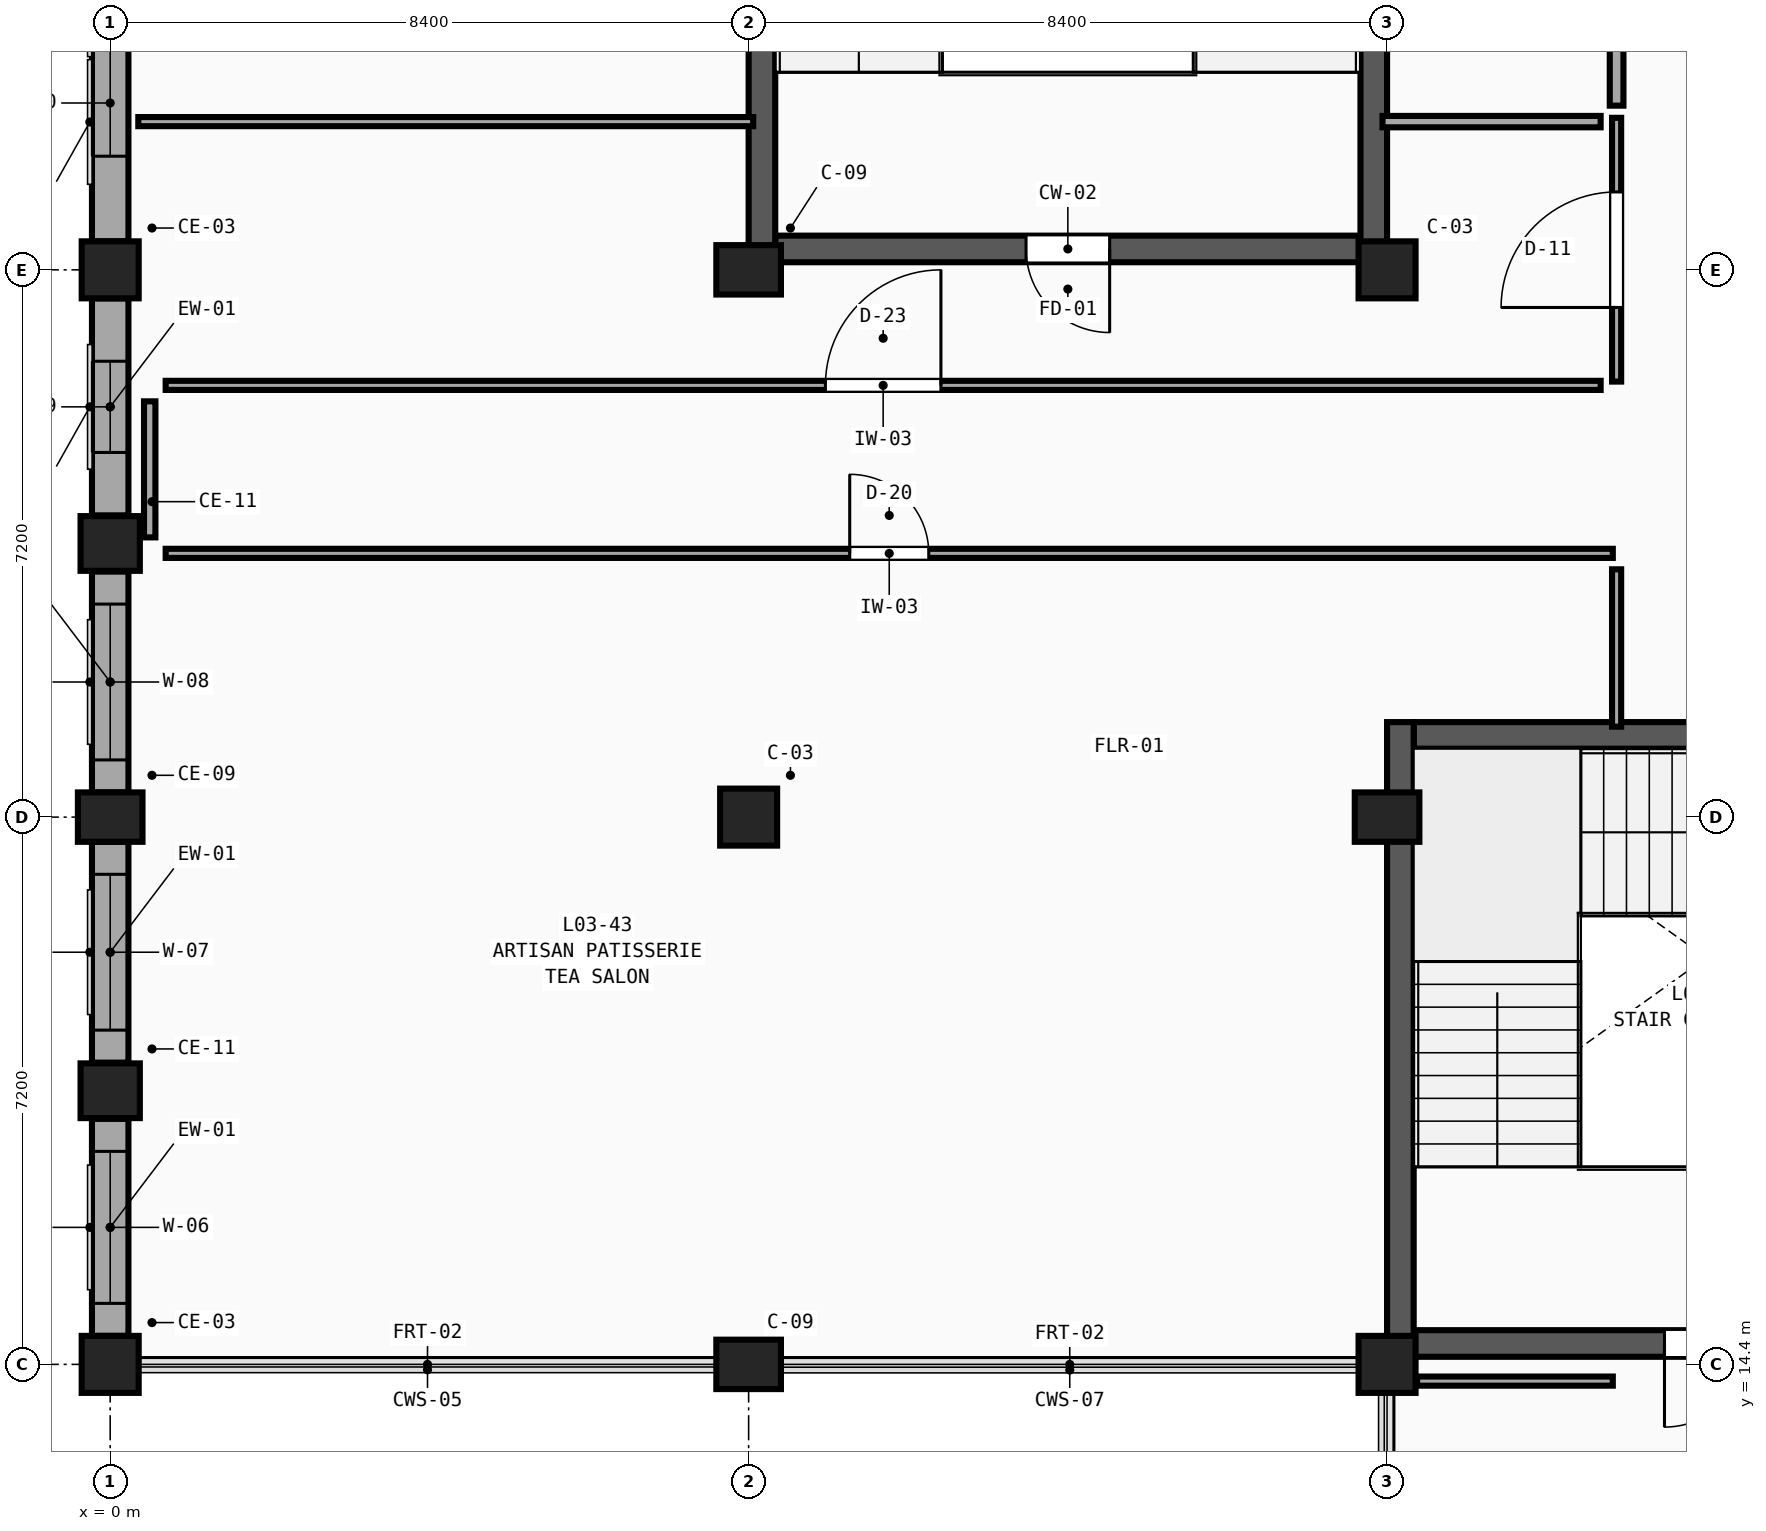
"""IFC4 building model, lengths in metres.
Left out: names, types, materials, properties, quantities, classifications, styles, units other than length and angle.
Written with IfcOpenShell. Run it as: python <this file> out.ifc"""

import sys

from ifc_helpers import new_model, si_unit, direction, frame, frame_2d, origin, origin_2d, place, context, subcontext, project, spatial, rectangle, extrude, element, fill, save


model = new_model("IFC4")
c1 = context("Model", 3, precision=1e-05, world=origin(), true_north=direction((0.0, 1.0)))
c2 = subcontext(c1, "Body", "Model", "MODEL_VIEW")
j1 = project(units=[si_unit("LENGTHUNIT", "METRE"), si_unit("PLANEANGLEUNIT", "RADIAN")], contexts=[c1])
p1 = place(None, origin())
s1 = spatial("IfcSite", under=j1, at=p1, CompositionType="ELEMENT")
p2 = place(p1, origin())
s2 = spatial("IfcBuilding", under=s1, at=p2, CompositionType="ELEMENT")
p3 = place(p2, frame((0.0, 0.0, 14.4)))
s3 = spatial("IfcBuildingStorey", under=s2, at=p3, CompositionType="ELEMENT", Elevation=14.4)
p4 = place(p3, frame((0.0, 14.4, 0.0), z_axis=(0.0, 0.0, 1.0), x_axis=(1.0, 0.0, 0.0)))
e1 = element("IfcColumn", 1, at=p4, inside=s3, PredefinedType="COLUMN", context=c2, shape_type="SweptSolid", body=[
    extrude(rectangle(XDim=0.75, YDim=0.75, at=origin_2d()), origin(), (0.0, 0.0, 1.0), 4.5),
])
p5 = place(p3, frame((0.0, 21.6, 0.0), z_axis=(0.0, 0.0, 1.0), x_axis=(1.0, 0.0, 0.0)))
e2 = element("IfcColumn", 2, at=p5, inside=s3, PredefinedType="COLUMN", context=c2, shape_type="SweptSolid", body=[
    extrude(rectangle(XDim=0.85, YDim=0.65, at=origin_2d()), origin(), (0.0, 0.0, 1.0), 4.5),
])
p6 = place(p3, frame((0.0, 28.8, 0.0), z_axis=(0.0, 0.0, 1.0), x_axis=(1.0, 0.0, 0.0)))
e3 = element("IfcColumn", 3, at=p6, inside=s3, PredefinedType="COLUMN", context=c2, shape_type="SweptSolid", body=[
    extrude(rectangle(XDim=0.75, YDim=0.75, at=origin_2d()), origin(), (0.0, 0.0, 1.0), 4.5),
])
p7 = place(p3, frame((8.4, 14.4, 0.0), z_axis=(0.0, 0.0, 1.0), x_axis=(1.0, 0.0, 0.0)))
e4 = element("IfcColumn", 4, at=p7, inside=s3, PredefinedType="COLUMN", context=c2, shape_type="SweptSolid", body=[
    extrude(rectangle(XDim=0.85, YDim=0.65, at=origin_2d()), origin(), (0.0, 0.0, 1.0), 4.5),
])
p8 = place(p3, frame((8.4, 21.6, 0.0), z_axis=(0.0, 0.0, 1.0), x_axis=(1.0, 0.0, 0.0)))
e5 = element("IfcColumn", 5, at=p8, inside=s3, PredefinedType="COLUMN", context=c2, shape_type="SweptSolid", body=[
    extrude(rectangle(XDim=0.75, YDim=0.75, at=origin_2d()), origin(), (0.0, 0.0, 1.0), 4.5),
])
p9 = place(p3, frame((8.4, 28.8, 0.0), z_axis=(0.0, 0.0, 1.0), x_axis=(1.0, 0.0, 0.0)))
e6 = element("IfcColumn", 6, at=p9, inside=s3, PredefinedType="COLUMN", context=c2, shape_type="SweptSolid", body=[
    extrude(rectangle(XDim=0.85, YDim=0.65, at=origin_2d()), origin(), (0.0, 0.0, 1.0), 4.5),
])
p10 = place(p3, frame((16.8, 14.4, 0.0), z_axis=(0.0, 0.0, 1.0), x_axis=(1.0, 0.0, 0.0)))
e7 = element("IfcColumn", 7, at=p10, inside=s3, PredefinedType="COLUMN", context=c2, shape_type="SweptSolid", body=[
    extrude(rectangle(XDim=0.75, YDim=0.75, at=origin_2d()), origin(), (0.0, 0.0, 1.0), 4.5),
])
p11 = place(p3, frame((16.8, 21.6, 0.0), z_axis=(0.0, 0.0, 1.0), x_axis=(1.0, 0.0, 0.0)))
e8 = element("IfcColumn", 8, at=p11, inside=s3, PredefinedType="COLUMN", context=c2, shape_type="SweptSolid", body=[
    extrude(rectangle(XDim=0.85, YDim=0.65, at=origin_2d()), origin(), (0.0, 0.0, 1.0), 4.5),
])
p12 = place(p3, frame((16.8, 28.8, 0.0), z_axis=(0.0, 0.0, 1.0), x_axis=(1.0, 0.0, 0.0)))
e9 = element("IfcColumn", 9, at=p12, inside=s3, PredefinedType="COLUMN", context=c2, shape_type="SweptSolid", body=[
    extrude(rectangle(XDim=0.75, YDim=0.75, at=origin_2d()), origin(), (0.0, 0.0, 1.0), 4.5),
])
for number, where, z_axis, x_axis in (
    (10, (0.0, 18.0, 0.0), (0.0, 0.0, 1.0), (1.0, 0.0, 0.0)),
    (11, (0.0, 25.2, 0.0), (0.0, 0.0, 1.0), (1.0, 0.0, 0.0)),
):
    element("IfcColumn", number, at=place(p3, frame(where, z_axis=z_axis, x_axis=x_axis)), inside=s3, PredefinedType="PILASTER", context=c2, shape_type="SweptSolid", body=[
        extrude(rectangle(XDim=0.78, YDim=0.72, at=origin_2d()), origin(), (0.0, 0.0, 1.0), 4.5),
    ])
p13 = place(p3, frame((0.0, 14.775, 0.0), z_axis=(0.0, 0.0, 1.0), x_axis=(0.0, 1.0, 0.0)))
e12 = element("IfcWall", 12, at=p13, inside=s3, PredefinedType="SOLIDWALL", context=c2, shape_type="SweptSolid", body=[
    extrude(rectangle(XDim=2.855, YDim=0.48, at=frame_2d((1.427, 0.0))), origin(), (0.0, 0.0, 1.0), 3.63),
])
p14 = place(p13, frame((0.427, 0.0, 0.75)))
e13 = element("IfcOpeningElement", 13, at=p14, cuts=e12, PredefinedType="OPENING", context=c2, shape_type="SweptSolid", body=[
    extrude(rectangle(XDim=2.0, YDim=1.9, at=frame_2d((1.0, 0.95))), frame((0.0, 0.26, 0.0), z_axis=(0.0, -1.0, 0.0), x_axis=(1.0, 0.0, 0.0)), (0.0, 0.0, 1.0), 0.52),
])
p15 = place(p3, frame((0.0, 18.37, 0.0), z_axis=(0.0, 0.0, 1.0), x_axis=(0.0, 1.0, 0.0)))
e14 = element("IfcWall", 14, at=p15, inside=s3, PredefinedType="SOLIDWALL", context=c2, shape_type="SweptSolid", body=[
    extrude(rectangle(XDim=2.905, YDim=0.48, at=frame_2d((1.452, 0.0))), origin(), (0.0, 0.0, 1.0), 3.63),
])
p16 = place(p15, frame((0.427, 0.0, 0.75)))
e15 = element("IfcOpeningElement", 15, at=p16, cuts=e14, PredefinedType="OPENING", context=c2, shape_type="SweptSolid", body=[
    extrude(rectangle(XDim=2.05, YDim=1.9, at=frame_2d((1.025, 0.95))), frame((0.0, 0.26, 0.0), z_axis=(0.0, -1.0, 0.0), x_axis=(1.0, 0.0, 0.0)), (0.0, 0.0, 1.0), 0.52),
])
p17 = place(p3, frame((0.0, 21.925, 0.0), z_axis=(0.0, 0.0, 1.0), x_axis=(0.0, 1.0, 0.0)))
e16 = element("IfcWall", 16, at=p17, inside=s3, PredefinedType="SOLIDWALL", context=c2, shape_type="SweptSolid", body=[
    extrude(rectangle(XDim=2.905, YDim=0.48, at=frame_2d((1.453, 0.0))), origin(), (0.0, 0.0, 1.0), 3.63),
])
p18 = place(p17, frame((0.427, 0.0, 0.75)))
e17 = element("IfcOpeningElement", 17, at=p18, cuts=e16, PredefinedType="OPENING", context=c2, shape_type="SweptSolid", body=[
    extrude(rectangle(XDim=2.05, YDim=1.9, at=frame_2d((1.025, 0.95))), frame((0.0, 0.26, 0.0), z_axis=(0.0, -1.0, 0.0), x_axis=(1.0, 0.0, 0.0)), (0.0, 0.0, 1.0), 0.52),
])
p19 = place(p3, frame((0.0, 25.57, 0.0), z_axis=(0.0, 0.0, 1.0), x_axis=(0.0, 1.0, 0.0)))
e18 = element("IfcWall", 18, at=p19, inside=s3, PredefinedType="SOLIDWALL", context=c2, shape_type="SweptSolid", body=[
    extrude(rectangle(XDim=2.855, YDim=0.48, at=frame_2d((1.427, 0.0))), origin(), (0.0, 0.0, 1.0), 3.63),
])
p20 = place(p19, frame((0.827, 0.0, 0.75)))
e19 = element("IfcOpeningElement", 19, at=p20, cuts=e18, PredefinedType="OPENING", context=c2, shape_type="SweptSolid", body=[
    extrude(rectangle(XDim=1.2, YDim=2.08, at=frame_2d((0.6, 1.04))), frame((0.0, 0.26, 0.0), z_axis=(0.0, -1.0, 0.0), x_axis=(1.0, 0.0, 0.0)), (0.0, 0.0, 1.0), 0.52),
])
p21 = place(p3, frame((0.0, 29.175, 0.0), z_axis=(0.0, 0.0, 1.0), x_axis=(0.0, 1.0, 0.0)))
e20 = element("IfcWall", 20, at=p21, inside=s3, PredefinedType="SOLIDWALL", context=c2, shape_type="SweptSolid", body=[
    extrude(rectangle(XDim=6.5, YDim=0.48, at=frame_2d((3.25, 0.0))), origin(), (0.0, 0.0, 1.0), 3.63),
])
p22 = place(p21, frame((1.12, 0.0, 0.75)))
e21 = element("IfcOpeningElement", 21, at=p22, cuts=e20, PredefinedType="OPENING", context=c2, shape_type="SweptSolid", body=[
    extrude(rectangle(XDim=1.4, YDim=2.08, at=frame_2d((0.7, 1.04))), frame((0.0, 0.26, 0.0), z_axis=(0.0, -1.0, 0.0), x_axis=(1.0, 0.0, 0.0)), (0.0, 0.0, 1.0), 0.52),
])
p23 = place(p21, frame((3.88, 0.0, 0.75)))
e22 = element("IfcOpeningElement", 22, at=p23, cuts=e20, PredefinedType="OPENING", context=c2, shape_type="SweptSolid", body=[
    extrude(rectangle(XDim=1.6, YDim=2.08, at=frame_2d((0.8, 1.04))), frame((0.0, 0.26, 0.0), z_axis=(0.0, -1.0, 0.0), x_axis=(1.0, 0.0, 0.0)), (0.0, 0.0, 1.0), 0.52),
])
p24 = place(p3, frame((24.85, 14.675, 0.0), z_axis=(0.0, 0.0, 1.0), x_axis=(-1.0, 0.0, 0.0)))
e23 = element("IfcWall", 23, at=p24, inside=s3, PredefinedType="SHEAR", context=c2, shape_type="SweptSolid", body=[
    extrude(rectangle(XDim=7.7, YDim=0.35, at=frame_2d((3.85, 0.0))), origin(), (0.0, 0.0, 1.0), 4.5),
])
p25 = place(p24, frame((3.3, 0.0, 0.0)))
e24 = element("IfcOpeningElement", 24, at=p25, cuts=e23, PredefinedType="OPENING", context=c2, shape_type="SweptSolid", body=[
    extrude(rectangle(XDim=1.1, YDim=2.2, at=frame_2d((0.55, 1.1))), frame((0.0, 0.195, 0.0), z_axis=(0.0, -1.0, 0.0), x_axis=(1.0, 0.0, 0.0)), (0.0, 0.0, 1.0), 0.39),
])
p26 = place(p3, frame((17.15, 22.675, 0.0), z_axis=(0.0, 0.0, 1.0), x_axis=(1.0, 0.0, 0.0)))
e25 = element("IfcWall", 25, at=p26, inside=s3, PredefinedType="SHEAR", context=c2, shape_type="SweptSolid", body=[
    extrude(rectangle(XDim=7.7, YDim=0.35, at=frame_2d((3.85, 0.0))), origin(), (0.0, 0.0, 1.0), 4.5),
])
p27 = place(p3, frame((16.975, 22.85, 0.0), z_axis=(0.0, 0.0, 1.0), x_axis=(0.0, -1.0, 0.0)))
e26 = element("IfcWall", 26, at=p27, inside=s3, PredefinedType="SHEAR", context=c2, shape_type="SweptSolid", body=[
    extrude(rectangle(XDim=8.35, YDim=0.35, at=frame_2d((4.175, 0.0))), origin(), (0.0, 0.0, 1.0), 4.5),
])
p28 = place(p3, frame((16.45, 29.075, 0.0), z_axis=(0.0, 0.0, 1.0), x_axis=(-1.0, 0.0, 0.0)))
e27 = element("IfcWall", 27, at=p28, inside=s3, PredefinedType="SHEAR", context=c2, shape_type="SweptSolid", body=[
    extrude(rectangle(XDim=7.7, YDim=0.35, at=frame_2d((3.85, 0.0))), origin(), (0.0, 0.0, 1.0), 4.5),
])
p29 = place(p28, frame((3.3, 0.0, 0.0)))
e28 = element("IfcOpeningElement", 28, at=p29, cuts=e27, PredefinedType="OPENING", context=c2, shape_type="SweptSolid", body=[
    extrude(rectangle(XDim=1.1, YDim=2.2, at=frame_2d((0.55, 1.1))), frame((0.0, 0.195, 0.0), z_axis=(0.0, -1.0, 0.0), x_axis=(1.0, 0.0, 0.0)), (0.0, 0.0, 1.0), 0.39),
])
for number, where, z_axis, x_axis in (
    (29, (8.575, 37.25, 0.0), (0.0, 0.0, 1.0), (0.0, -1.0, 0.0)),
    (30, (16.625, 28.9, 0.0), (0.0, 0.0, 1.0), (0.0, 1.0, 0.0)),
):
    element("IfcWall", number, at=place(p3, frame(where, z_axis=z_axis, x_axis=x_axis)), inside=s3, PredefinedType="SHEAR", context=c2, shape_type="SweptSolid", body=[
        extrude(rectangle(XDim=8.35, YDim=0.35, at=frame_2d((4.175, 0.0))), origin(), (0.0, 0.0, 1.0), 4.5),
    ])
p30 = place(p3, frame((0.73, 25.07, 0.0), z_axis=(0.0, 0.0, 1.0), x_axis=(1.0, 0.0, 0.0)))
e31 = element("IfcWall", 31, at=p30, inside=s3, PredefinedType="PARTITIONING", context=c2, shape_type="SweptSolid", body=[
    extrude(rectangle(XDim=19.04, YDim=0.12, at=frame_2d((9.52, 0.0))), origin(), (0.0, 0.0, 1.0), 4.18),
])
p31 = place(p30, frame((9.0, 0.0, 0.0)))
e32 = element("IfcOpeningElement", 32, at=p31, cuts=e31, PredefinedType="OPENING", context=c2, shape_type="SweptSolid", body=[
    extrude(rectangle(XDim=1.04, YDim=2.29, at=frame_2d((0.52, 1.145))), frame((0.0, 0.08, 0.0), z_axis=(0.0, -1.0, 0.0), x_axis=(1.0, 0.0, 0.0)), (0.0, 0.0, 1.0), 0.16),
])
p32 = place(p3, frame((0.73, 27.28, 0.0), z_axis=(0.0, 0.0, 1.0), x_axis=(1.0, 0.0, 0.0)))
e33 = element("IfcWall", 33, at=p32, inside=s3, PredefinedType="PARTITIONING", context=c2, shape_type="SweptSolid", body=[
    extrude(rectangle(XDim=18.88, YDim=0.12, at=frame_2d((9.44, 0.0))), origin(), (0.0, 0.0, 1.0), 4.18),
])
p33 = place(p32, frame((8.68, 0.0, 0.0)))
e34 = element("IfcOpeningElement", 34, at=p33, cuts=e33, PredefinedType="OPENING", context=c2, shape_type="SweptSolid", body=[
    extrude(rectangle(XDim=1.52, YDim=2.29, at=frame_2d((0.76, 1.145))), frame((0.0, 0.08, 0.0), z_axis=(0.0, -1.0, 0.0), x_axis=(1.0, 0.0, 0.0)), (0.0, 0.0, 1.0), 0.16),
])
p34 = place(p3, frame((19.82, 30.96, 0.0), z_axis=(0.0, 0.0, 1.0), x_axis=(0.0, 1.0, 0.0)))
e35 = element("IfcWall", 35, at=p34, inside=s3, PredefinedType="PARTITIONING", context=c2, shape_type="SweptSolid", body=[
    extrude(rectangle(XDim=5.84, YDim=0.18, at=frame_2d((2.92, 0.0))), origin(), (0.0, 0.0, 1.0), 4.18),
])
p35 = place(p34, frame((2.32, 0.0, 0.0)))
e36 = element("IfcOpeningElement", 36, at=p35, cuts=e35, PredefinedType="OPENING", context=c2, shape_type="SweptSolid", body=[
    extrude(rectangle(XDim=1.2, YDim=2.05, at=frame_2d((0.6, 1.025))), frame((0.0, 0.11, 0.0), z_axis=(0.0, -1.0, 0.0), x_axis=(1.0, 0.0, 0.0)), (0.0, 0.0, 1.0), 0.22),
])
p36 = place(p3, frame((19.82, 27.33, 0.0), z_axis=(0.0, 0.0, 1.0), x_axis=(0.0, 1.0, 0.0)))
e37 = element("IfcWall", 37, at=p36, inside=s3, PredefinedType="PARTITIONING", context=c2, shape_type="SweptSolid", body=[
    extrude(rectangle(XDim=3.47, YDim=0.12, at=frame_2d((1.735, 0.0))), origin(), (0.0, 0.0, 1.0), 4.18),
])
p37 = place(p36, frame((0.975, 0.0, 0.0)))
e38 = element("IfcOpeningElement", 38, at=p37, cuts=e37, PredefinedType="OPENING", context=c2, shape_type="SweptSolid", body=[
    extrude(rectangle(XDim=1.52, YDim=2.13, at=frame_2d((0.76, 1.065))), frame((0.0, 0.08, 0.0), z_axis=(0.0, -1.0, 0.0), x_axis=(1.0, 0.0, 0.0)), (0.0, 0.0, 1.0), 0.16),
])
p38 = place(p3, frame((17.195, 14.18, 0.0), z_axis=(0.0, 0.0, 1.0), x_axis=(1.0, 0.0, 0.0)))
e39 = element("IfcWall", 39, at=p38, inside=s3, PredefinedType="PARTITIONING", context=c2, shape_type="SweptSolid", body=[
    extrude(rectangle(XDim=2.575, YDim=0.12, at=frame_2d((1.288, 0.0))), origin(), (0.0, 0.0, 1.0), 3.73),
])
p39 = place(p3, frame((19.82, 22.79, 0.0), z_axis=(0.0, 0.0, 1.0), x_axis=(0.0, 1.0, 0.0)))
e40 = element("IfcWall", 40, at=p39, inside=s3, PredefinedType="PARTITIONING", context=c2, shape_type="SweptSolid", body=[
    extrude(rectangle(XDim=2.07, YDim=0.12, at=frame_2d((1.035, 0.0))), origin(), (0.0, 0.0, 1.0), 4.18),
])
p40 = place(p3, frame((0.52, 25.28, 0.0), z_axis=(0.0, 0.0, 1.0), x_axis=(0.0, 1.0, 0.0)))
e41 = element("IfcWall", 41, at=p40, inside=s3, PredefinedType="PARTITIONING", context=c2, shape_type="SweptSolid", body=[
    extrude(rectangle(XDim=1.79, YDim=0.15, at=frame_2d((0.895, 0.0))), origin(), (0.0, 0.0, 1.0), 3.63),
])
p41 = place(p3, frame((0.37, 30.75, 0.0), z_axis=(0.0, 0.0, 1.0), x_axis=(1.0, 0.0, 0.0)))
e42 = element("IfcWall", 42, at=p41, inside=s3, PredefinedType="PARTITIONING", context=c2, shape_type="SweptSolid", body=[
    extrude(rectangle(XDim=8.09, YDim=0.12, at=frame_2d((4.045, 0.0))), origin(), (0.0, 0.0, 1.0), 4.18),
])
p42 = place(p3, frame((16.74, 30.75, 0.0), z_axis=(0.0, 0.0, 1.0), x_axis=(1.0, 0.0, 0.0)))
e43 = element("IfcWall", 43, at=p42, inside=s3, PredefinedType="PARTITIONING", context=c2, shape_type="SweptSolid", body=[
    extrude(rectangle(XDim=2.87, YDim=0.15, at=frame_2d((1.435, 0.0))), origin(), (0.0, 0.0, 1.0), 4.18),
])
p43 = place(p14, origin())
e44 = element("IfcWindow", 44, at=p43, inside=s3, PartitioningType="TRIPLE_PANEL_VERTICAL", PredefinedType="WINDOW", context=c2, shape_type="SweptSolid", body=[
    extrude(rectangle(XDim=2.0, YDim=1.9, at=frame_2d((1.0, 0.95))), frame((0.0, 0.03, 0.0), z_axis=(0.0, -1.0, 0.0), x_axis=(1.0, 0.0, 0.0)), (0.0, 0.0, 1.0), 0.06),
])
fill(e13, e44)
p44 = place(p16, origin())
e45 = element("IfcWindow", 45, at=p44, inside=s3, PartitioningType="TRIPLE_PANEL_VERTICAL", PredefinedType="WINDOW", context=c2, shape_type="SweptSolid", body=[
    extrude(rectangle(XDim=2.05, YDim=1.9, at=frame_2d((1.025, 0.95))), frame((0.0, 0.03, 0.0), z_axis=(0.0, -1.0, 0.0), x_axis=(1.0, 0.0, 0.0)), (0.0, 0.0, 1.0), 0.06),
])
fill(e15, e45)
p45 = place(p18, origin())
e46 = element("IfcWindow", 46, at=p45, inside=s3, PartitioningType="TRIPLE_PANEL_VERTICAL", PredefinedType="WINDOW", context=c2, shape_type="SweptSolid", body=[
    extrude(rectangle(XDim=2.05, YDim=1.9, at=frame_2d((1.025, 0.95))), frame((0.0, 0.03, 0.0), z_axis=(0.0, -1.0, 0.0), x_axis=(1.0, 0.0, 0.0)), (0.0, 0.0, 1.0), 0.06),
])
fill(e17, e46)
p46 = place(p20, origin())
e47 = element("IfcWindow", 47, at=p46, inside=s3, PartitioningType="SINGLE_PANEL", PredefinedType="WINDOW", context=c2, shape_type="SweptSolid", body=[
    extrude(rectangle(XDim=1.2, YDim=2.08, at=frame_2d((0.6, 1.04))), frame((0.0, 0.03, 0.0), z_axis=(0.0, -1.0, 0.0), x_axis=(1.0, 0.0, 0.0)), (0.0, 0.0, 1.0), 0.06),
])
fill(e19, e47)
p47 = place(p22, origin())
e48 = element("IfcWindow", 48, at=p47, inside=s3, PartitioningType="DOUBLE_PANEL_VERTICAL", PredefinedType="WINDOW", context=c2, shape_type="SweptSolid", body=[
    extrude(rectangle(XDim=1.4, YDim=2.08, at=frame_2d((0.7, 1.04))), frame((0.0, 0.03, 0.0), z_axis=(0.0, -1.0, 0.0), x_axis=(1.0, 0.0, 0.0)), (0.0, 0.0, 1.0), 0.06),
])
fill(e21, e48)
p48 = place(p25, origin())
e49 = element("IfcDoor", 49, at=p48, inside=s3, OperationType="SINGLE_SWING_RIGHT", PredefinedType="DOOR", context=c2, shape_type="SweptSolid", body=[
    extrude(rectangle(XDim=1.1, YDim=2.2, at=frame_2d((0.55, 1.1))), frame((0.0, 0.025, 0.0), z_axis=(0.0, -1.0, 0.0), x_axis=(1.0, 0.0, 0.0)), (0.0, 0.0, 1.0), 0.05),
])
fill(e24, e49)
p49 = place(p29, origin())
e50 = element("IfcDoor", 50, at=p49, inside=s3, OperationType="SINGLE_SWING_LEFT", PredefinedType="DOOR", context=c2, shape_type="SweptSolid", body=[
    extrude(rectangle(XDim=1.1, YDim=2.2, at=frame_2d((0.55, 1.1))), frame((0.0, 0.025, 0.0), z_axis=(0.0, -1.0, 0.0), x_axis=(1.0, 0.0, 0.0)), (0.0, 0.0, 1.0), 0.05),
])
fill(e28, e50)
p50 = place(p31, origin())
e51 = element("IfcDoor", 51, at=p50, inside=s3, OperationType="SINGLE_SWING_LEFT", PredefinedType="DOOR", context=c2, shape_type="SweptSolid", body=[
    extrude(rectangle(XDim=1.04, YDim=2.29, at=frame_2d((0.52, 1.145))), frame((0.0, 0.025, 0.0), z_axis=(0.0, -1.0, 0.0), x_axis=(1.0, 0.0, 0.0)), (0.0, 0.0, 1.0), 0.05),
])
fill(e32, e51)
p51 = place(p33, origin())
e52 = element("IfcDoor", 52, at=p51, inside=s3, OperationType="SINGLE_SWING_RIGHT", PredefinedType="DOOR", context=c2, shape_type="SweptSolid", body=[
    extrude(rectangle(XDim=1.52, YDim=2.29, at=frame_2d((0.76, 1.145))), frame((0.0, 0.025, 0.0), z_axis=(0.0, -1.0, 0.0), x_axis=(1.0, 0.0, 0.0)), (0.0, 0.0, 1.0), 0.05),
])
fill(e34, e52)
p52 = place(p37, origin())
e53 = element("IfcDoor", 53, at=p52, inside=s3, OperationType="SINGLE_SWING_LEFT", PredefinedType="DOOR", context=c2, shape_type="SweptSolid", body=[
    extrude(rectangle(XDim=1.52, YDim=2.13, at=frame_2d((0.76, 1.065))), frame((0.0, 0.025, 0.0), z_axis=(0.0, -1.0, 0.0), x_axis=(1.0, 0.0, 0.0)), (0.0, 0.0, 1.0), 0.05),
])
fill(e38, e53)
save(model, sys.argv[1])
